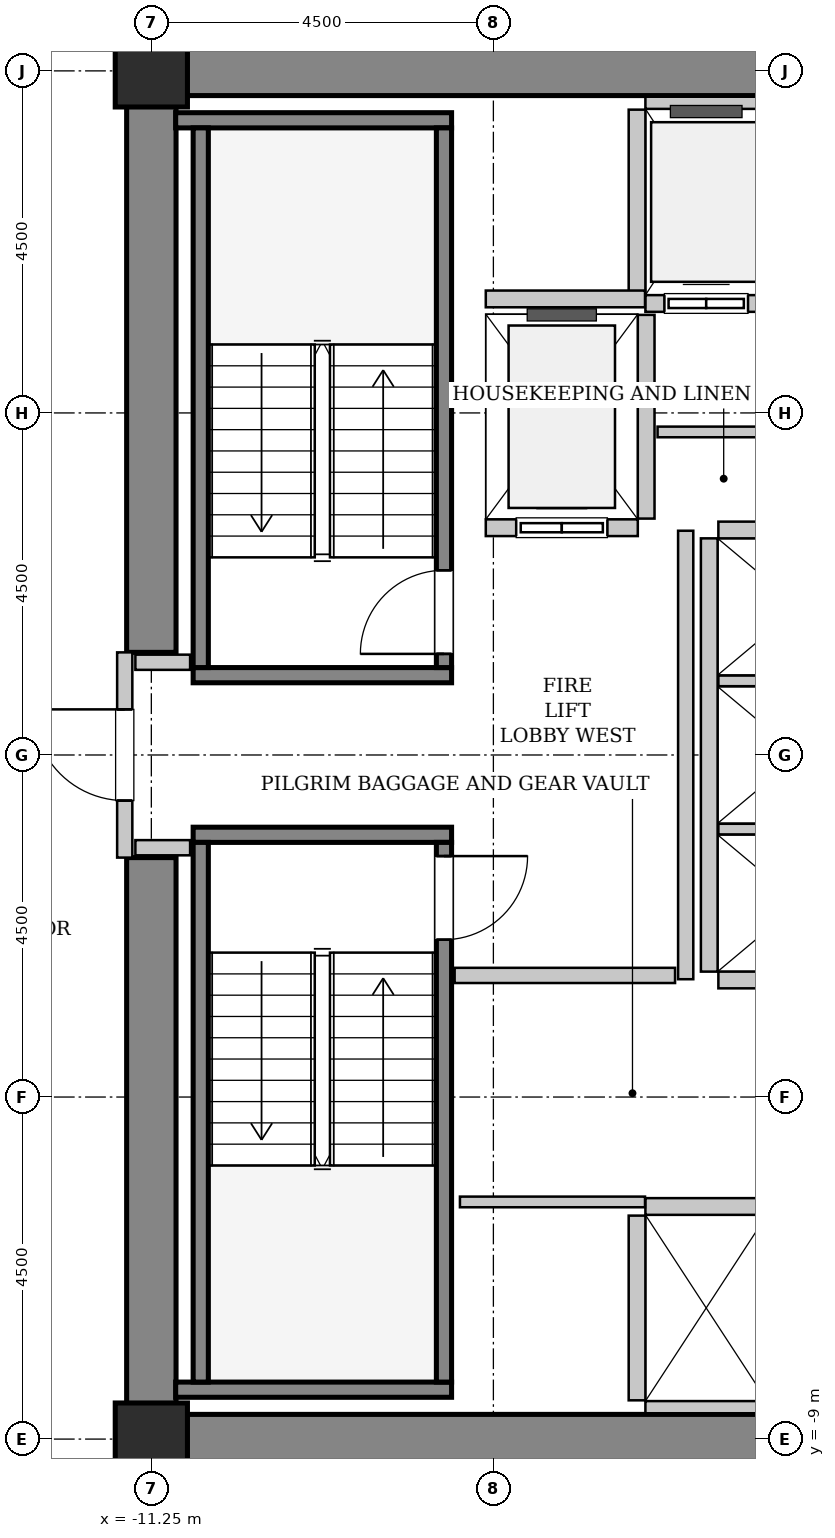
"""IFC4 building model, lengths in metres.
Left out: names, types, materials, properties, quantities, classifications, styles, units other than length and angle.
Written with IfcOpenShell. Run it as: python <this file> out.ifc"""

import sys

from ifc_helpers import new_model, si_unit, direction, frame, frame_2d, origin, origin_2d, place, context, subcontext, project, spatial, rectangle, hollow_rectangle, extrude, source, transform, mapped, element, fill, save


model = new_model("IFC4")
c1 = context("Model", 3, precision=1e-05, world=origin(), true_north=direction((0.0, 1.0)))
c2 = subcontext(c1, "Body", "Model", "MODEL_VIEW")
j1 = project(units=[si_unit("LENGTHUNIT", "METRE"), si_unit("PLANEANGLEUNIT", "RADIAN")], contexts=[c1])
p1 = place(None, origin())
s1 = spatial("IfcSite", under=j1, at=p1, CompositionType="ELEMENT")
p2 = place(p1, origin())
s2 = spatial("IfcBuilding", under=s1, at=p2, CompositionType="ELEMENT")
p3 = place(p2, frame((0.0, 0.0, 36.8)))
s3 = spatial("IfcBuildingStorey", under=s2, at=p3, CompositionType="ELEMENT", Elevation=36.8)
m1 = source(origin(), c2, "Body", "SweptSolid", [
    extrude(rectangle(XDim=10.025, YDim=0.65, at=frame_2d((5.012, 0.0))), origin(), (0.0, 0.0, 1.0), 3.8),
])
for number, where, z_axis, x_axis in (
    (1, (-11.575, 9.0, 0.0), (0.0, 0.0, 1.0), (1.0, 0.0, 0.0)),
    (2, (-11.575, -9.0, 0.0), (0.0, 0.0, 1.0), (1.0, 0.0, 0.0)),
):
    element("IfcWall", number, at=place(p3, frame(where, z_axis=z_axis, x_axis=x_axis)), inside=s3, PredefinedType="SHEAR", context=c2, shape_type="MappedRepresentation", body=[
        mapped(m1, transform((0.0, 0.0, 0.0), x_axis=(1.0, 0.0, 0.0), y_axis=(0.0, 1.0, 0.0), z_axis=(0.0, 0.0, 1.0), scale=1.0)),
    ])
m2 = source(origin(), c2, "Body", "SweptSolid", [
    extrude(rectangle(XDim=7.325, YDim=0.65, at=frame_2d((3.663, 0.0))), origin(), (0.0, 0.0, 1.0), 3.8),
])
for number, where, z_axis, x_axis in (
    (3, (-11.25, -8.675, 0.0), (0.0, 0.0, 1.0), (0.0, 1.0, 0.0)),
    (4, (-11.25, 1.35, 0.0), (0.0, 0.0, 1.0), (0.0, 1.0, 0.0)),
):
    element("IfcWall", number, at=place(p3, frame(where, z_axis=z_axis, x_axis=x_axis)), inside=s3, PredefinedType="SHEAR", context=c2, shape_type="MappedRepresentation", body=[
        mapped(m2, transform((0.0, 0.0, 0.0), x_axis=(1.0, 0.0, 0.0), y_axis=(0.0, 1.0, 0.0), z_axis=(0.0, 0.0, 1.0), scale=1.0)),
    ])
m3 = source(origin(), c2, "Body", "SweptSolid", [
    extrude(hollow_rectangle(XDim=0.95, YDim=0.95, WallThickness=0.045, InnerFilletRadius=0.045, OuterFilletRadius=0.09, at=origin_2d()), origin(), (0.0, 0.0, 1.0), 3.8),
])
for number, where, z_axis, x_axis in (
    (5, (-11.25, -9.0, 0.0), (0.0, 0.0, 1.0), (1.0, 0.0, 0.0)),
    (6, (-11.25, 9.0, 0.0), (0.0, 0.0, 1.0), (1.0, 0.0, 0.0)),
):
    element("IfcColumn", number, at=place(p3, frame(where, z_axis=z_axis, x_axis=x_axis)), inside=s3, PredefinedType="COLUMN", context=c2, shape_type="MappedRepresentation", body=[
        mapped(m3, transform((0.0, 0.0, 0.0), x_axis=(1.0, 0.0, 0.0), y_axis=(0.0, 1.0, 0.0), z_axis=(0.0, 0.0, 1.0), scale=1.0)),
    ])
m4 = source(origin(), c2, "Body", "SweptSolid", [
    extrude(rectangle(XDim=3.4, YDim=0.2, at=frame_2d((1.7, 0.0))), origin(), (0.0, 0.0, 1.0), 3.8),
])
p4 = place(p3, frame((-7.3, 1.05, 0.0), z_axis=(0.0, 0.0, 1.0), x_axis=(-1.0, 0.0, 0.0)))
e7 = element("IfcWall", 7, at=p4, inside=s3, PredefinedType="SOLIDWALL", context=c2, shape_type="MappedRepresentation", body=[
    mapped(m4, transform((0.0, 0.0, 0.0), x_axis=(1.0, 0.0, 0.0), y_axis=(0.0, 1.0, 0.0), z_axis=(0.0, 0.0, 1.0), scale=1.0)),
])
m5 = source(origin(), c2, "Body", "SweptSolid", [
    extrude(rectangle(XDim=3.63, YDim=0.2, at=frame_2d((1.815, 0.0))), origin(), (0.0, 0.0, 1.0), 3.8),
])
p5 = place(p3, frame((-7.3, 8.35, 0.0), z_axis=(0.0, 0.0, 1.0), x_axis=(-1.0, 0.0, 0.0)))
e8 = element("IfcWall", 8, at=p5, inside=s3, PredefinedType="SOLIDWALL", context=c2, shape_type="MappedRepresentation", body=[
    mapped(m5, transform((0.0, 0.0, 0.0), x_axis=(1.0, 0.0, 0.0), y_axis=(0.0, 1.0, 0.0), z_axis=(0.0, 0.0, 1.0), scale=1.0)),
])
m6 = source(origin(), c2, "Body", "SweptSolid", [
    extrude(rectangle(XDim=7.1, YDim=0.2, at=frame_2d((3.55, 0.0))), origin(), (0.0, 0.0, 1.0), 3.8),
])
p6 = place(p3, frame((-7.4, 1.15, 0.0), z_axis=(0.0, 0.0, 1.0), x_axis=(0.0, 1.0, 0.0)))
e9 = element("IfcWall", 9, at=p6, inside=s3, PredefinedType="SOLIDWALL", context=c2, shape_type="MappedRepresentation", body=[
    mapped(m6, transform((0.0, 0.0, 0.0), x_axis=(1.0, 0.0, 0.0), y_axis=(0.0, 1.0, 0.0), z_axis=(0.0, 0.0, 1.0), scale=1.0)),
])
p7 = place(p6, frame((0.18, 0.0, 0.0)))
e10 = element("IfcOpeningElement", 10, at=p7, cuts=e9, PredefinedType="OPENING", context=c2, shape_type="SweptSolid", body=[
    extrude(rectangle(XDim=1.1, YDim=2.15, at=frame_2d((0.55, 1.075))), frame((0.0, 0.11, 0.0), z_axis=(0.0, -1.0, 0.0), x_axis=(1.0, 0.0, 0.0)), (0.0, 0.0, 1.0), 0.22),
])
p8 = place(p3, frame((-10.6, 1.15, 0.0), z_axis=(0.0, 0.0, 1.0), x_axis=(0.0, 1.0, 0.0)))
e11 = element("IfcWall", 11, at=p8, inside=s3, PredefinedType="SOLIDWALL", context=c2, shape_type="MappedRepresentation", body=[
    mapped(m6, transform((0.0, 0.0, 0.0), x_axis=(1.0, 0.0, 0.0), y_axis=(0.0, 1.0, 0.0), z_axis=(0.0, 0.0, 1.0), scale=1.0)),
])
p9 = place(p3, frame((-10.7, -1.05, 0.0), z_axis=(0.0, 0.0, 1.0), x_axis=(1.0, 0.0, 0.0)))
e12 = element("IfcWall", 12, at=p9, inside=s3, PredefinedType="SOLIDWALL", context=c2, shape_type="MappedRepresentation", body=[
    mapped(m4, transform((0.0, 0.0, 0.0), x_axis=(1.0, 0.0, 0.0), y_axis=(0.0, 1.0, 0.0), z_axis=(0.0, 0.0, 1.0), scale=1.0)),
])
p10 = place(p3, frame((-10.93, -8.35, 0.0), z_axis=(0.0, 0.0, 1.0), x_axis=(1.0, 0.0, 0.0)))
e13 = element("IfcWall", 13, at=p10, inside=s3, PredefinedType="SOLIDWALL", context=c2, shape_type="MappedRepresentation", body=[
    mapped(m5, transform((0.0, 0.0, 0.0), x_axis=(1.0, 0.0, 0.0), y_axis=(0.0, 1.0, 0.0), z_axis=(0.0, 0.0, 1.0), scale=1.0)),
])
p11 = place(p3, frame((-10.6, -1.15, 0.0), z_axis=(0.0, 0.0, 1.0), x_axis=(0.0, -1.0, 0.0)))
e14 = element("IfcWall", 14, at=p11, inside=s3, PredefinedType="SOLIDWALL", context=c2, shape_type="MappedRepresentation", body=[
    mapped(m6, transform((0.0, 0.0, 0.0), x_axis=(1.0, 0.0, 0.0), y_axis=(0.0, 1.0, 0.0), z_axis=(0.0, 0.0, 1.0), scale=1.0)),
])
p12 = place(p3, frame((-7.4, -1.15, 0.0), z_axis=(0.0, 0.0, 1.0), x_axis=(0.0, -1.0, 0.0)))
e15 = element("IfcWall", 15, at=p12, inside=s3, PredefinedType="SOLIDWALL", context=c2, shape_type="MappedRepresentation", body=[
    mapped(m6, transform((0.0, 0.0, 0.0), x_axis=(1.0, 0.0, 0.0), y_axis=(0.0, 1.0, 0.0), z_axis=(0.0, 0.0, 1.0), scale=1.0)),
])
p13 = place(p12, frame((0.18, 0.0, 0.0)))
e16 = element("IfcOpeningElement", 16, at=p13, cuts=e15, PredefinedType="OPENING", context=c2, shape_type="SweptSolid", body=[
    extrude(rectangle(XDim=1.1, YDim=2.15, at=frame_2d((0.55, 1.075))), frame((0.0, 0.11, 0.0), z_axis=(0.0, -1.0, 0.0), x_axis=(1.0, 0.0, 0.0)), (0.0, 0.0, 1.0), 0.22),
])
m7 = source(origin(), c2, "Body", "SweptSolid", [
    extrude(rectangle(XDim=2.0, YDim=0.22, at=frame_2d((1.0, 0.0))), origin(), (0.0, 0.0, 1.0), 3.535),
])
p14 = place(p3, frame((-6.85, 2.99, 0.0), z_axis=(0.0, 0.0, 1.0), x_axis=(1.0, 0.0, 0.0)))
e17 = element("IfcWall", 17, at=p14, inside=s3, PredefinedType="SOLIDWALL", context=c2, shape_type="MappedRepresentation", body=[
    mapped(m7, transform((0.0, 0.0, 0.0), x_axis=(1.0, 0.0, 0.0), y_axis=(0.0, 1.0, 0.0), z_axis=(0.0, 0.0, 1.0), scale=1.0)),
])
p15 = place(p14, frame((0.4, 0.0, 0.0)))
e18 = element("IfcOpeningElement", 18, at=p15, cuts=e17, PredefinedType="OPENING", context=c2, shape_type="SweptSolid", body=[
    extrude(rectangle(XDim=1.2, YDim=2.2, at=frame_2d((0.6, 1.1))), frame((0.0, 0.12, 0.0), z_axis=(0.0, -1.0, 0.0), x_axis=(1.0, 0.0, 0.0)), (0.0, 0.0, 1.0), 0.24),
])
m8 = source(origin(), c2, "Body", "SweptSolid", [
    extrude(rectangle(XDim=2.68, YDim=0.22, at=frame_2d((1.34, 0.0))), origin(), (0.0, 0.0, 1.0), 3.535),
])
p16 = place(p3, frame((-4.74, 3.11, 0.0), z_axis=(0.0, 0.0, 1.0), x_axis=(0.0, 1.0, 0.0)))
e19 = element("IfcWall", 19, at=p16, inside=s3, PredefinedType="SOLIDWALL", context=c2, shape_type="MappedRepresentation", body=[
    mapped(m8, transform((0.0, 0.0, 0.0), x_axis=(1.0, 0.0, 0.0), y_axis=(0.0, 1.0, 0.0), z_axis=(0.0, 0.0, 1.0), scale=1.0)),
])
m9 = source(origin(), c2, "Body", "SweptSolid", [
    extrude(rectangle(XDim=3.2, YDim=0.22, at=frame_2d((1.6, 0.0))), origin(), (0.0, 0.0, 1.0), 3.535),
])
p17 = place(p3, frame((-4.75, 5.94, 0.0), z_axis=(0.0, 0.0, 1.0), x_axis=(1.0, 0.0, 0.0)))
e20 = element("IfcWall", 20, at=p17, inside=s3, PredefinedType="SOLIDWALL", context=c2, shape_type="MappedRepresentation", body=[
    mapped(m9, transform((0.0, 0.0, 0.0), x_axis=(1.0, 0.0, 0.0), y_axis=(0.0, 1.0, 0.0), z_axis=(0.0, 0.0, 1.0), scale=1.0)),
])
p18 = place(p17, frame((0.25, 0.0, 0.0)))
e21 = element("IfcOpeningElement", 21, at=p18, cuts=e20, PredefinedType="OPENING", context=c2, shape_type="SweptSolid", body=[
    extrude(rectangle(XDim=1.1, YDim=2.2, at=frame_2d((0.55, 1.1))), frame((0.0, 0.12, 0.0), z_axis=(0.0, -1.0, 0.0), x_axis=(1.0, 0.0, 0.0)), (0.0, 0.0, 1.0), 0.24),
])
p19 = place(p17, frame((1.875, 0.0, 0.0)))
e22 = element("IfcOpeningElement", 22, at=p19, cuts=e20, PredefinedType="OPENING", context=c2, shape_type="SweptSolid", body=[
    extrude(rectangle(XDim=1.1, YDim=2.2, at=frame_2d((0.55, 1.1))), frame((0.0, 0.12, 0.0), z_axis=(0.0, -1.0, 0.0), x_axis=(1.0, 0.0, 0.0)), (0.0, 0.0, 1.0), 0.24),
])
m10 = source(origin(), c2, "Body", "SweptSolid", [
    extrude(rectangle(XDim=3.2, YDim=0.16, at=frame_2d((1.6, 0.0))), origin(), (0.0, 0.0, 1.0), 2.425),
])
p20 = place(p3, frame((-1.55, 8.58, 0.0), z_axis=(0.0, 0.0, 1.0), x_axis=(-1.0, 0.0, 0.0)))
e23 = element("IfcWall", 23, at=p20, inside=s3, PredefinedType="PARTITIONING", context=c2, shape_type="MappedRepresentation", body=[
    mapped(m10, transform((0.0, 0.0, 0.0), x_axis=(1.0, 0.0, 0.0), y_axis=(0.0, 1.0, 0.0), z_axis=(0.0, 0.0, 1.0), scale=1.0)),
])
m11 = source(origin(), c2, "Body", "SweptSolid", [
    extrude(rectangle(XDim=2.43, YDim=0.22, at=frame_2d((1.215, 0.0))), origin(), (0.0, 0.0, 1.0), 3.535),
])
p21 = place(p3, frame((-4.86, 8.49, 0.0), z_axis=(0.0, 0.0, 1.0), x_axis=(0.0, -1.0, 0.0)))
e24 = element("IfcWall", 24, at=p21, inside=s3, PredefinedType="SOLIDWALL", context=c2, shape_type="MappedRepresentation", body=[
    mapped(m11, transform((0.0, 0.0, 0.0), x_axis=(1.0, 0.0, 0.0), y_axis=(0.0, 1.0, 0.0), z_axis=(0.0, 0.0, 1.0), scale=1.0)),
])
p22 = place(p3, frame((-1.55, -5.94, 0.0), z_axis=(0.0, 0.0, 1.0), x_axis=(-1.0, 0.0, 0.0)))
e25 = element("IfcWall", 25, at=p22, inside=s3, PredefinedType="SOLIDWALL", context=c2, shape_type="MappedRepresentation", body=[
    mapped(m9, transform((0.0, 0.0, 0.0), x_axis=(1.0, 0.0, 0.0), y_axis=(0.0, 1.0, 0.0), z_axis=(0.0, 0.0, 1.0), scale=1.0)),
])
p23 = place(p3, frame((-4.75, -8.58, 0.0), z_axis=(0.0, 0.0, 1.0), x_axis=(1.0, 0.0, 0.0)))
e26 = element("IfcWall", 26, at=p23, inside=s3, PredefinedType="PARTITIONING", context=c2, shape_type="MappedRepresentation", body=[
    mapped(m10, transform((0.0, 0.0, 0.0), x_axis=(1.0, 0.0, 0.0), y_axis=(0.0, 1.0, 0.0), z_axis=(0.0, 0.0, 1.0), scale=1.0)),
])
p24 = place(p3, frame((-4.86, -6.06, 0.0), z_axis=(0.0, 0.0, 1.0), x_axis=(0.0, -1.0, 0.0)))
e27 = element("IfcWall", 27, at=p24, inside=s3, PredefinedType="SOLIDWALL", context=c2, shape_type="MappedRepresentation", body=[
    mapped(m11, transform((0.0, 0.0, 0.0), x_axis=(1.0, 0.0, 0.0), y_axis=(0.0, 1.0, 0.0), z_axis=(0.0, 0.0, 1.0), scale=1.0)),
])
m12 = source(origin(), c2, "Body", "SweptSolid", [
    extrude(rectangle(XDim=5.7, YDim=0.22, at=frame_2d((2.85, 0.0))), origin(), (0.0, 0.0, 1.0), 3.535),
])
p25 = place(p3, frame((-3.91, 2.85, 0.0), z_axis=(0.0, 0.0, 1.0), x_axis=(0.0, -1.0, 0.0)))
e28 = element("IfcWall", 28, at=p25, inside=s3, PredefinedType="SOLIDWALL", context=c2, shape_type="MappedRepresentation", body=[
    mapped(m12, transform((0.0, 0.0, 0.0), x_axis=(1.0, 0.0, 0.0), y_axis=(0.0, 1.0, 0.0), z_axis=(0.0, 0.0, 1.0), scale=1.0)),
])
m13 = source(origin(), c2, "Body", "SweptSolid", [
    extrude(rectangle(XDim=2.13, YDim=0.22, at=frame_2d((1.065, 0.0))), origin(), (0.0, 0.0, 1.0), 3.535),
])
p26 = place(p3, frame((-3.79, -2.96, 0.0), z_axis=(0.0, 0.0, 1.0), x_axis=(1.0, 0.0, 0.0)))
e29 = element("IfcWall", 29, at=p26, inside=s3, PredefinedType="SOLIDWALL", context=c2, shape_type="MappedRepresentation", body=[
    mapped(m13, transform((0.0, 0.0, 0.0), x_axis=(1.0, 0.0, 0.0), y_axis=(0.0, 1.0, 0.0), z_axis=(0.0, 0.0, 1.0), scale=1.0)),
])
m14 = source(origin(), c2, "Body", "SweptSolid", [
    extrude(rectangle(XDim=2.13, YDim=0.14, at=frame_2d((1.065, 0.0))), origin(), (0.0, 0.0, 1.0), 3.535),
])
for number, where, z_axis, x_axis in (
    (30, (-3.79, -0.975, 0.0), (0.0, 0.0, 1.0), (1.0, 0.0, 0.0)),
    (31, (-3.79, 0.975, 0.0), (0.0, 0.0, 1.0), (1.0, 0.0, 0.0)),
):
    element("IfcWall", number, at=place(p3, frame(where, z_axis=z_axis, x_axis=x_axis)), inside=s3, PredefinedType="PARTITIONING", context=c2, shape_type="MappedRepresentation", body=[
        mapped(m14, transform((0.0, 0.0, 0.0), x_axis=(1.0, 0.0, 0.0), y_axis=(0.0, 1.0, 0.0), z_axis=(0.0, 0.0, 1.0), scale=1.0)),
    ])
p27 = place(p3, frame((-1.66, 2.96, 0.0), z_axis=(0.0, 0.0, 1.0), x_axis=(-1.0, 0.0, 0.0)))
e32 = element("IfcWall", 32, at=p27, inside=s3, PredefinedType="SOLIDWALL", context=c2, shape_type="MappedRepresentation", body=[
    mapped(m13, transform((0.0, 0.0, 0.0), x_axis=(1.0, 0.0, 0.0), y_axis=(0.0, 1.0, 0.0), z_axis=(0.0, 0.0, 1.0), scale=1.0)),
])
m15 = source(origin(), c2, "Body", "SweptSolid", [
    extrude(rectangle(XDim=2.095, YDim=0.22, at=frame_2d((1.048, 0.0))), origin(), (0.0, 0.0, 1.0), 3.535),
])
p28 = place(p3, frame((-6.85, 6.0, 0.0), z_axis=(0.0, 0.0, 1.0), x_axis=(1.0, 0.0, 0.0)))
e33 = element("IfcWall", 33, at=p28, inside=s3, PredefinedType="SOLIDWALL", context=c2, shape_type="MappedRepresentation", body=[
    mapped(m15, transform((0.0, 0.0, 0.0), x_axis=(1.0, 0.0, 0.0), y_axis=(0.0, 1.0, 0.0), z_axis=(0.0, 0.0, 1.0), scale=1.0)),
])
m16 = source(origin(), c2, "Body", "SweptSolid", [
    extrude(rectangle(XDim=2.7, YDim=0.2, at=frame_2d((1.35, 0.0))), origin(), (0.0, 0.0, 1.0), 2.425),
])
p29 = place(p3, frame((-11.6, -1.35, 0.0), z_axis=(0.0, 0.0, 1.0), x_axis=(0.0, 1.0, 0.0)))
e34 = element("IfcWall", 34, at=p29, inside=s3, PredefinedType="PARTITIONING", context=c2, shape_type="MappedRepresentation", body=[
    mapped(m16, transform((0.0, 0.0, 0.0), x_axis=(1.0, 0.0, 0.0), y_axis=(0.0, 1.0, 0.0), z_axis=(0.0, 0.0, 1.0), scale=1.0)),
])
p30 = place(p29, frame((0.75, 0.0, 0.0)))
e35 = element("IfcOpeningElement", 35, at=p30, cuts=e34, PredefinedType="OPENING", context=c2, shape_type="SweptSolid", body=[
    extrude(rectangle(XDim=1.2, YDim=2.15, at=frame_2d((0.6, 1.075))), frame((0.0, 0.11, 0.0), z_axis=(0.0, -1.0, 0.0), x_axis=(1.0, 0.0, 0.0)), (0.0, 0.0, 1.0), 0.22),
])
m17 = source(origin(), c2, "Body", "SweptSolid", [
    extrude(rectangle(XDim=5.9, YDim=0.2, at=frame_2d((2.95, 0.0))), origin(), (0.0, 0.0, 1.0), 3.535),
])
p31 = place(p3, frame((-4.22, -2.95, 0.0), z_axis=(0.0, 0.0, 1.0), x_axis=(0.0, 1.0, 0.0)))
e36 = element("IfcWall", 36, at=p31, inside=s3, PredefinedType="PARTITIONING", context=c2, shape_type="MappedRepresentation", body=[
    mapped(m17, transform((0.0, 0.0, 0.0), x_axis=(1.0, 0.0, 0.0), y_axis=(0.0, 1.0, 0.0), z_axis=(0.0, 0.0, 1.0), scale=1.0)),
])
m18 = source(origin(), c2, "Body", "SweptSolid", [
    extrude(rectangle(XDim=2.9, YDim=0.2, at=frame_2d((1.45, 0.0))), origin(), (0.0, 0.0, 1.0), 3.535),
])
p32 = place(p3, frame((-7.26, -2.9, 0.0), z_axis=(0.0, 0.0, 1.0), x_axis=(1.0, 0.0, 0.0)))
e37 = element("IfcWall", 37, at=p32, inside=s3, PredefinedType="PARTITIONING", context=c2, shape_type="MappedRepresentation", body=[
    mapped(m18, transform((0.0, 0.0, 0.0), x_axis=(1.0, 0.0, 0.0), y_axis=(0.0, 1.0, 0.0), z_axis=(0.0, 0.0, 1.0), scale=1.0)),
])
m19 = source(origin(), c2, "Body", "SweptSolid", [
    extrude(rectangle(XDim=0.72, YDim=0.2, at=frame_2d((0.36, 0.0))), origin(), (0.0, 0.0, 1.0), 3.535),
])
for number, where, z_axis, x_axis in (
    (38, (-11.46, 1.22, 0.0), (0.0, 0.0, 1.0), (1.0, 0.0, 0.0)),
    (39, (-11.46, -1.22, 0.0), (0.0, 0.0, 1.0), (1.0, 0.0, 0.0)),
):
    element("IfcWall", number, at=place(p3, frame(where, z_axis=z_axis, x_axis=x_axis)), inside=s3, PredefinedType="PARTITIONING", context=c2, shape_type="MappedRepresentation", body=[
        mapped(m19, transform((0.0, 0.0, 0.0), x_axis=(1.0, 0.0, 0.0), y_axis=(0.0, 1.0, 0.0), z_axis=(0.0, 0.0, 1.0), scale=1.0)),
    ])
m20 = source(origin(), c2, "Body", "SweptSolid", [
    extrude(rectangle(XDim=2.95, YDim=0.14, at=frame_2d((1.475, 0.0))), origin(), (0.0, 0.0, 1.0), 3.535),
])
p33 = place(p3, frame((-4.59, 4.25, 0.0), z_axis=(0.0, 0.0, 1.0), x_axis=(1.0, 0.0, 0.0)))
e40 = element("IfcWall", 40, at=p33, inside=s3, PredefinedType="PARTITIONING", context=c2, shape_type="MappedRepresentation", body=[
    mapped(m20, transform((0.0, 0.0, 0.0), x_axis=(1.0, 0.0, 0.0), y_axis=(0.0, 1.0, 0.0), z_axis=(0.0, 0.0, 1.0), scale=1.0)),
])
m21 = source(origin(), c2, "Body", "SweptSolid", [
    extrude(rectangle(XDim=2.435, YDim=0.14, at=frame_2d((1.218, 0.0))), origin(), (0.0, 0.0, 1.0), 3.535),
])
p34 = place(p3, frame((-7.19, -5.88, 0.0), z_axis=(0.0, 0.0, 1.0), x_axis=(1.0, 0.0, 0.0)))
e41 = element("IfcWall", 41, at=p34, inside=s3, PredefinedType="PARTITIONING", context=c2, shape_type="MappedRepresentation", body=[
    mapped(m21, transform((0.0, 0.0, 0.0), x_axis=(1.0, 0.0, 0.0), y_axis=(0.0, 1.0, 0.0), z_axis=(0.0, 0.0, 1.0), scale=1.0)),
])
m22 = source(origin(), c2, "Body", "SweptSolid", [
    extrude(rectangle(XDim=1.1, YDim=2.15, at=frame_2d((0.55, 1.075))), frame((0.0, 0.025, 0.0), z_axis=(0.0, -1.0, 0.0), x_axis=(1.0, 0.0, 0.0)), (0.0, 0.0, 1.0), 0.05),
])
p35 = place(p7, origin())
e42 = element("IfcDoor", 42, at=p35, inside=s3, OperationType="SINGLE_SWING_LEFT", PredefinedType="DOOR", context=c2, shape_type="MappedRepresentation", body=[
    mapped(m22, transform((0.0, 0.0, 0.0), x_axis=(1.0, 0.0, 0.0), y_axis=(0.0, 1.0, 0.0), z_axis=(0.0, 0.0, 1.0), scale=1.0)),
])
fill(e10, e42)
p36 = place(p13, origin())
e43 = element("IfcDoor", 43, at=p36, inside=s3, OperationType="SINGLE_SWING_LEFT", PredefinedType="DOOR", context=c2, shape_type="MappedRepresentation", body=[
    mapped(m22, transform((0.0, 0.0, 0.0), x_axis=(1.0, 0.0, 0.0), y_axis=(0.0, 1.0, 0.0), z_axis=(0.0, 0.0, 1.0), scale=1.0)),
])
fill(e16, e43)
m23 = source(origin(), c2, "Body", "SweptSolid", [
    extrude(rectangle(XDim=1.2, YDim=2.2, at=frame_2d((0.6, 1.1))), frame((0.0, 0.025, 0.0), z_axis=(0.0, -1.0, 0.0), x_axis=(1.0, 0.0, 0.0)), (0.0, 0.0, 1.0), 0.05),
])
p37 = place(p15, origin())
e44 = element("IfcDoor", 44, at=p37, inside=s3, OperationType="SLIDING_TO_LEFT", PredefinedType="DOOR", context=c2, shape_type="MappedRepresentation", body=[
    mapped(m23, transform((0.0, 0.0, 0.0), x_axis=(1.0, 0.0, 0.0), y_axis=(0.0, 1.0, 0.0), z_axis=(0.0, 0.0, 1.0), scale=1.0)),
])
fill(e18, e44)
m24 = source(origin(), c2, "Body", "SweptSolid", [
    extrude(rectangle(XDim=1.1, YDim=2.2, at=frame_2d((0.55, 1.1))), frame((0.0, 0.025, 0.0), z_axis=(0.0, -1.0, 0.0), x_axis=(1.0, 0.0, 0.0)), (0.0, 0.0, 1.0), 0.05),
])
p38 = place(p18, origin())
e45 = element("IfcDoor", 45, at=p38, inside=s3, OperationType="DOUBLE_DOOR_SLIDING", PredefinedType="DOOR", context=c2, shape_type="MappedRepresentation", body=[
    mapped(m24, transform((0.0, 0.0, 0.0), x_axis=(1.0, 0.0, 0.0), y_axis=(0.0, 1.0, 0.0), z_axis=(0.0, 0.0, 1.0), scale=1.0)),
])
fill(e21, e45)
m25 = source(origin(), c2, "Body", "SweptSolid", [
    extrude(rectangle(XDim=1.2, YDim=2.15, at=frame_2d((0.6, 1.075))), frame((0.0, 0.025, 0.0), z_axis=(0.0, -1.0, 0.0), x_axis=(1.0, 0.0, 0.0)), (0.0, 0.0, 1.0), 0.05),
])
p39 = place(p30, origin())
e46 = element("IfcDoor", 46, at=p39, inside=s3, OperationType="SINGLE_SWING_RIGHT", PredefinedType="DOOR", context=c2, shape_type="MappedRepresentation", body=[
    mapped(m25, transform((0.0, 0.0, 0.0), x_axis=(1.0, 0.0, 0.0), y_axis=(0.0, 1.0, 0.0), z_axis=(0.0, 0.0, 1.0), scale=1.0)),
])
fill(e35, e46)
save(model, sys.argv[1])
